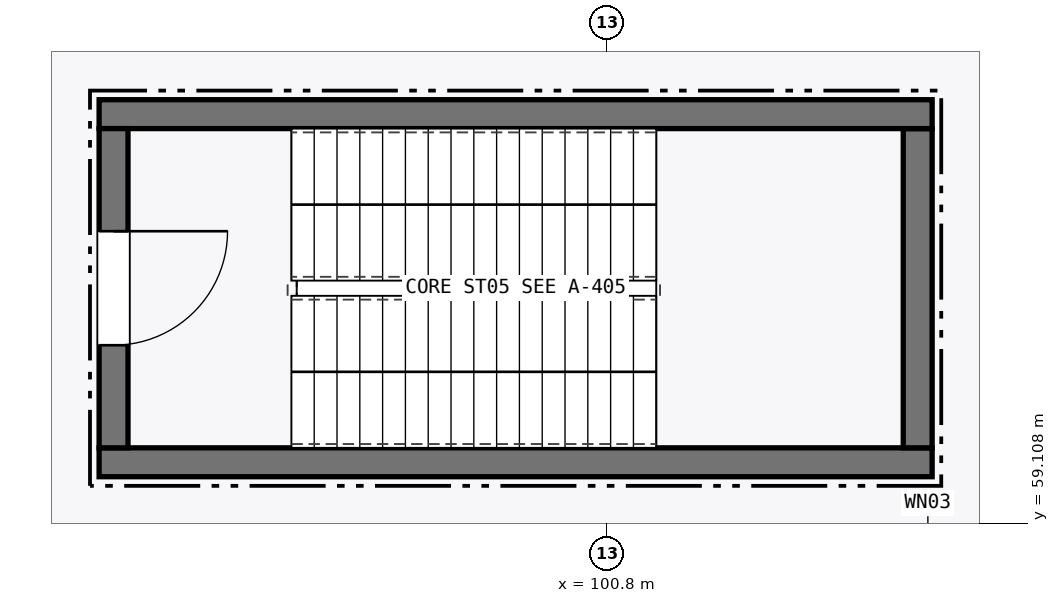
"""IFC4 building model, lengths in metres.
Left out: names, types, materials, properties, quantities, classifications, styles, units other than length and angle.
Written with IfcOpenShell. Run it as: python <this file> out.ifc"""

import sys

from ifc_helpers import new_model, si_unit, direction, frame, frame_2d, origin, place, context, subcontext, project, spatial, rectangle, extrude, element, fill, save


model = new_model("IFC4")
c1 = context("Model", 3, precision=1e-05, world=origin(), true_north=direction((0.0, 1.0)))
c2 = subcontext(c1, "Body", "Model", "MODEL_VIEW")
j1 = project(units=[si_unit("LENGTHUNIT", "METRE"), si_unit("PLANEANGLEUNIT", "RADIAN")], contexts=[c1])
p1 = place(None, origin())
s1 = spatial("IfcSite", under=j1, at=p1, CompositionType="ELEMENT")
p2 = place(p1, origin())
s2 = spatial("IfcBuilding", under=s1, at=p2, CompositionType="ELEMENT")
p3 = place(p2, frame((0.0, 0.0, 11.4)))
s3 = spatial("IfcBuildingStorey", under=s2, at=p3, CompositionType="ELEMENT", Elevation=11.4)
p4 = place(p3, frame((94.12, 59.91, 0.0), z_axis=(0.0, 0.0, 1.0), x_axis=(1.0, 0.0, 0.0)))
e1 = element("IfcWall", 1, at=p4, inside=s3, PredefinedType="SHEAR", context=c2, shape_type="SweptSolid", body=[
    extrude(rectangle(XDim=10.96, YDim=0.38, at=frame_2d((5.48, 0.0))), origin(), (0.0, 0.0, 1.0), 4.845),
])
p5 = place(p3, frame((104.89, 60.1, 0.0), z_axis=(0.0, 0.0, 1.0), x_axis=(0.0, 1.0, 0.0)))
e2 = element("IfcWall", 2, at=p5, inside=s3, PredefinedType="SHEAR", context=c2, shape_type="SweptSolid", body=[
    extrude(rectangle(XDim=4.2, YDim=0.38, at=frame_2d((2.1, 0.0))), origin(), (0.0, 0.0, 1.0), 4.845),
])
p6 = place(p3, frame((105.08, 64.49, 0.0), z_axis=(0.0, 0.0, 1.0), x_axis=(-1.0, 0.0, 0.0)))
e3 = element("IfcWall", 3, at=p6, inside=s3, PredefinedType="SHEAR", context=c2, shape_type="SweptSolid", body=[
    extrude(rectangle(XDim=10.96, YDim=0.38, at=frame_2d((5.48, 0.0))), origin(), (0.0, 0.0, 1.0), 4.845),
])
p7 = place(p3, frame((94.31, 64.3, 0.0), z_axis=(0.0, 0.0, 1.0), x_axis=(0.0, -1.0, 0.0)))
e4 = element("IfcWall", 4, at=p7, inside=s3, PredefinedType="SHEAR", context=c2, shape_type="SweptSolid", body=[
    extrude(rectangle(XDim=4.2, YDim=0.38, at=frame_2d((2.1, 0.0))), origin(), (0.0, 0.0, 1.0), 4.845),
])
p8 = place(p7, frame((1.35, 0.0, 0.0)))
e5 = element("IfcOpeningElement", 5, at=p8, cuts=e4, PredefinedType="OPENING", context=c2, shape_type="SweptSolid", body=[
    extrude(rectangle(XDim=1.5, YDim=2.15, at=frame_2d((0.75, 1.075))), frame((0.0, 0.2, 0.0), z_axis=(0.0, -1.0, 0.0), x_axis=(1.0, 0.0, 0.0)), (0.0, 0.0, 1.0), 0.4),
])
p9 = place(p8, origin())
e6 = element("IfcDoor", 6, at=p9, inside=s3, OperationType="SINGLE_SWING_LEFT", PredefinedType="DOOR", context=c2, shape_type="SweptSolid", body=[
    extrude(rectangle(XDim=1.5, YDim=2.15, at=frame_2d((0.75, 1.075))), frame((0.0, 0.025, 0.0), z_axis=(0.0, -1.0, 0.0), x_axis=(1.0, 0.0, 0.0)), (0.0, 0.0, 1.0), 0.05),
])
fill(e5, e6)
save(model, sys.argv[1])
